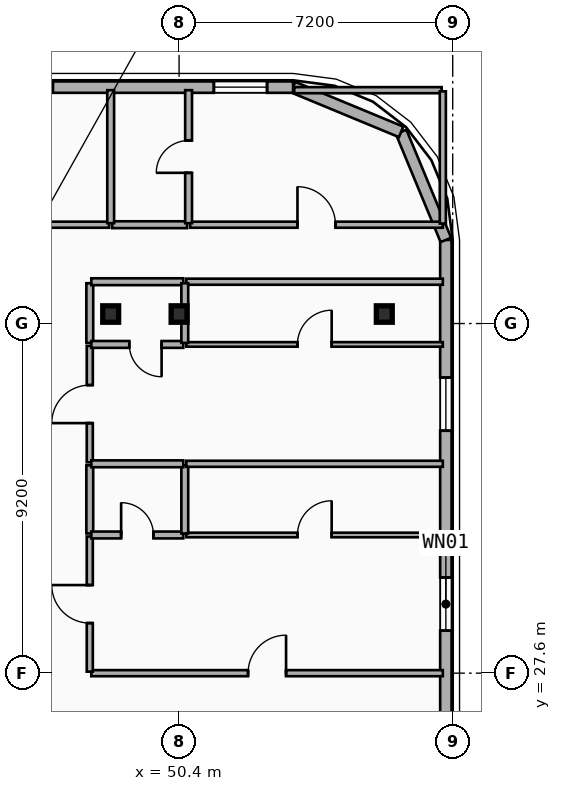
"""IFC4 building model, lengths in metres.
Left out: names, types, materials, properties, quantities, classifications, styles, units other than length and angle.
Written with IfcOpenShell. Run it as: python <this file> out.ifc"""

import sys

from ifc_helpers import new_model, si_unit, direction, frame, frame_2d, origin, origin_2d, place, context, subcontext, project, spatial, rectangle, i_section, extrude, element, fill, save


model = new_model("IFC4")
c1 = context("Model", 3, precision=1e-05, world=origin(), true_north=direction((0.0, 1.0)))
c2 = subcontext(c1, "Body", "Model", "MODEL_VIEW")
j1 = project(units=[si_unit("LENGTHUNIT", "METRE"), si_unit("PLANEANGLEUNIT", "RADIAN")], contexts=[c1])
p1 = place(None, origin())
s1 = spatial("IfcSite", under=j1, at=p1, CompositionType="ELEMENT")
p2 = place(p1, origin())
s2 = spatial("IfcBuilding", under=s1, at=p2, CompositionType="ELEMENT")
p3 = place(p2, frame((0.0, 0.0, 108.3)))
s3 = spatial("IfcBuildingStorey", under=s2, at=p3, CompositionType="ELEMENT", Elevation=108.3)
for number, where, z_axis, x_axis in (
    (1, (48.6, 37.05, 0.0), (0.0, 0.0, 1.0), (1.0, 0.0, 0.0)),
    (2, (50.4, 37.05, 0.0), (0.0, 0.0, 1.0), (1.0, 0.0, 0.0)),
    (3, (55.8, 37.05, 0.0), (0.0, 0.0, 1.0), (1.0, 0.0, 0.0)),
):
    element("IfcColumn", number, at=place(p3, frame(where, z_axis=z_axis, x_axis=x_axis)), inside=s3, PredefinedType="COLUMN", context=c2, shape_type="SweptSolid", body=[
        extrude(i_section(OverallWidth=0.418, OverallDepth=0.432, WebThickness=0.035, FlangeThickness=0.056, FilletRadius=0.015, at=origin_2d()), origin(), (0.0, 0.0, 1.0), 3.5),
    ])
p4 = place(p3, frame((57.42, 39.0, 0.0), z_axis=(0.0, 0.0, 1.0), x_axis=(0.0, -1.0, 0.0)))
e4 = element("IfcWall", 4, at=p4, inside=s3, PredefinedType="SOLIDWALL", context=c2, shape_type="SweptSolid", body=[
    extrude(rectangle(XDim=18.0, YDim=0.3, at=frame_2d((9.0, 0.0))), origin(), (0.0, 0.0, 1.0), 3.24),
])
p5 = place(p4, frame((8.882, 0.0, 0.48)))
e5 = element("IfcOpeningElement", 5, at=p5, cuts=e4, PredefinedType="OPENING", context=c2, shape_type="SweptSolid", body=[
    extrude(rectangle(XDim=1.4, YDim=1.8, at=frame_2d((0.7, 0.9))), frame((0.0, 0.16, 0.0), z_axis=(0.0, -1.0, 0.0), x_axis=(1.0, 0.0, 0.0)), (0.0, 0.0, 1.0), 0.32),
])
p6 = place(p4, frame((3.621, 0.0, 0.48)))
e6 = element("IfcOpeningElement", 6, at=p6, cuts=e4, PredefinedType="OPENING", context=c2, shape_type="SweptSolid", body=[
    extrude(rectangle(XDim=1.4, YDim=1.8, at=frame_2d((0.7, 0.9))), frame((0.0, 0.16, 0.0), z_axis=(0.0, -1.0, 0.0), x_axis=(1.0, 0.0, 0.0)), (0.0, 0.0, 1.0), 0.32),
])
p7 = place(p3, frame((56.243, 41.843, 0.0), z_axis=(0.0, 0.0, 1.0), x_axis=(0.382636798336, -0.92389884758, 0.0)))
e7 = element("IfcWall", 7, at=p7, inside=s3, PredefinedType="SOLIDWALL", context=c2, shape_type="SweptSolid", body=[
    extrude(rectangle(XDim=3.077, YDim=0.3, at=frame_2d((1.538, 0.0))), origin(), (0.0, 0.0, 1.0), 3.24),
])
p8 = place(p3, frame((53.4, 43.02, 0.0), z_axis=(0.0, 0.0, 1.0), x_axis=(0.923882414032, -0.382676475685, 0.0)))
e8 = element("IfcWall", 8, at=p8, inside=s3, PredefinedType="SOLIDWALL", context=c2, shape_type="SweptSolid", body=[
    extrude(rectangle(XDim=3.077, YDim=0.3, at=frame_2d((1.539, 0.0))), origin(), (0.0, 0.0, 1.0), 3.24),
])
p9 = place(p3, frame((4.2, 43.02, 0.0), z_axis=(0.0, 0.0, 1.0), x_axis=(1.0, 0.0, 0.0)))
e9 = element("IfcWall", 9, at=p9, inside=s3, PredefinedType="SOLIDWALL", context=c2, shape_type="SweptSolid", body=[
    extrude(rectangle(XDim=49.2, YDim=0.3, at=frame_2d((24.6, 0.0))), origin(), (0.0, 0.0, 1.0), 3.24),
])
p10 = place(p9, frame((8.09, 0.0, 0.85)))
e10 = element("IfcOpeningElement", 10, at=p10, cuts=e9, PredefinedType="OPENING", context=c2, shape_type="SweptSolid", body=[
    extrude(rectangle(XDim=1.4, YDim=1.8, at=frame_2d((0.7, 0.9))), frame((0.0, 0.16, 0.0), z_axis=(0.0, -1.0, 0.0), x_axis=(1.0, 0.0, 0.0)), (0.0, 0.0, 1.0), 0.32),
])
p11 = place(p9, frame((11.42, 0.0, 0.85)))
e11 = element("IfcOpeningElement", 11, at=p11, cuts=e9, PredefinedType="OPENING", context=c2, shape_type="SweptSolid", body=[
    extrude(rectangle(XDim=1.4, YDim=1.8, at=frame_2d((0.7, 0.9))), frame((0.0, 0.16, 0.0), z_axis=(0.0, -1.0, 0.0), x_axis=(1.0, 0.0, 0.0)), (0.0, 0.0, 1.0), 0.32),
])
p12 = place(p9, frame((19.22, 0.0, 0.85)))
e12 = element("IfcOpeningElement", 12, at=p12, cuts=e9, PredefinedType="OPENING", context=c2, shape_type="SweptSolid", body=[
    extrude(rectangle(XDim=1.4, YDim=1.8, at=frame_2d((0.7, 0.9))), frame((0.0, 0.16, 0.0), z_axis=(0.0, -1.0, 0.0), x_axis=(1.0, 0.0, 0.0)), (0.0, 0.0, 1.0), 0.32),
])
p13 = place(p9, frame((22.441, 0.0, 0.85)))
e13 = element("IfcOpeningElement", 13, at=p13, cuts=e9, PredefinedType="OPENING", context=c2, shape_type="SweptSolid", body=[
    extrude(rectangle(XDim=1.4, YDim=1.8, at=frame_2d((0.7, 0.9))), frame((0.0, 0.16, 0.0), z_axis=(0.0, -1.0, 0.0), x_axis=(1.0, 0.0, 0.0)), (0.0, 0.0, 1.0), 0.32),
])
p14 = place(p9, frame((30.766, 0.0, 0.85)))
e14 = element("IfcOpeningElement", 14, at=p14, cuts=e9, PredefinedType="OPENING", context=c2, shape_type="SweptSolid", body=[
    extrude(rectangle(XDim=1.4, YDim=1.8, at=frame_2d((0.7, 0.9))), frame((0.0, 0.16, 0.0), z_axis=(0.0, -1.0, 0.0), x_axis=(1.0, 0.0, 0.0)), (0.0, 0.0, 1.0), 0.32),
])
p15 = place(p9, frame((32.876, 0.0, 0.85)))
e15 = element("IfcOpeningElement", 15, at=p15, cuts=e9, PredefinedType="OPENING", context=c2, shape_type="SweptSolid", body=[
    extrude(rectangle(XDim=1.4, YDim=1.8, at=frame_2d((0.7, 0.9))), frame((0.0, 0.16, 0.0), z_axis=(0.0, -1.0, 0.0), x_axis=(1.0, 0.0, 0.0)), (0.0, 0.0, 1.0), 0.32),
])
p16 = place(p9, frame((38.857, 0.0, 0.85)))
e16 = element("IfcOpeningElement", 16, at=p16, cuts=e9, PredefinedType="OPENING", context=c2, shape_type="SweptSolid", body=[
    extrude(rectangle(XDim=1.4, YDim=1.8, at=frame_2d((0.7, 0.9))), frame((0.0, 0.16, 0.0), z_axis=(0.0, -1.0, 0.0), x_axis=(1.0, 0.0, 0.0)), (0.0, 0.0, 1.0), 0.32),
])
p17 = place(p9, frame((41.478, 0.0, 0.85)))
e17 = element("IfcOpeningElement", 17, at=p17, cuts=e9, PredefinedType="OPENING", context=c2, shape_type="SweptSolid", body=[
    extrude(rectangle(XDim=1.4, YDim=1.8, at=frame_2d((0.7, 0.9))), frame((0.0, 0.16, 0.0), z_axis=(0.0, -1.0, 0.0), x_axis=(1.0, 0.0, 0.0)), (0.0, 0.0, 1.0), 0.32),
])
p18 = place(p9, frame((47.115, 0.0, 0.85)))
e18 = element("IfcOpeningElement", 18, at=p18, cuts=e9, PredefinedType="OPENING", context=c2, shape_type="SweptSolid", body=[
    extrude(rectangle(XDim=1.4, YDim=1.8, at=frame_2d((0.7, 0.9))), frame((0.0, 0.16, 0.0), z_axis=(0.0, -1.0, 0.0), x_axis=(1.0, 0.0, 0.0)), (0.0, 0.0, 1.0), 0.32),
])
p19 = place(p3, frame((48.09, 27.6, 0.0), z_axis=(0.0, 0.0, 1.0), x_axis=(1.0, 0.0, 0.0)))
e19 = element("IfcWall", 19, at=p19, inside=s3, PredefinedType="PARTITIONING", context=c2, shape_type="SweptSolid", body=[
    extrude(rectangle(XDim=9.25, YDim=0.16, at=frame_2d((4.625, 0.0))), origin(), (0.0, 0.0, 1.0), 2.57),
])
p20 = place(p19, frame((4.125, 0.0, 0.0)))
e20 = element("IfcOpeningElement", 20, at=p20, cuts=e19, PredefinedType="OPENING", context=c2, shape_type="SweptSolid", body=[
    extrude(rectangle(XDim=1.0, YDim=2.15, at=frame_2d((0.5, 1.075))), frame((0.0, 0.09, 0.0), z_axis=(0.0, -1.0, 0.0), x_axis=(1.0, 0.0, 0.0)), (0.0, 0.0, 1.0), 0.18),
])
p21 = place(p3, frame((48.05, 27.64, 0.0), z_axis=(0.0, 0.0, 1.0), x_axis=(0.0, 1.0, 0.0)))
e21 = element("IfcWall", 21, at=p21, inside=s3, PredefinedType="PARTITIONING", context=c2, shape_type="SweptSolid", body=[
    extrude(rectangle(XDim=3.556, YDim=0.16, at=frame_2d((1.778, 0.0))), origin(), (0.0, 0.0, 1.0), 3.24),
])
p22 = place(p21, frame((1.278, 0.0, 0.0)))
e22 = element("IfcOpeningElement", 22, at=p22, cuts=e21, PredefinedType="OPENING", context=c2, shape_type="SweptSolid", body=[
    extrude(rectangle(XDim=1.0, YDim=2.15, at=frame_2d((0.5, 1.075))), frame((0.0, 0.09, 0.0), z_axis=(0.0, -1.0, 0.0), x_axis=(1.0, 0.0, 0.0)), (0.0, 0.0, 1.0), 0.18),
])
p23 = place(p3, frame((48.05, 31.276, 0.0), z_axis=(0.0, 0.0, 1.0), x_axis=(0.0, 1.0, 0.0)))
e23 = element("IfcWall", 23, at=p23, inside=s3, PredefinedType="PLUMBINGWALL", context=c2, shape_type="SweptSolid", body=[
    extrude(rectangle(XDim=1.793, YDim=0.18, at=frame_2d((0.896, 0.0))), origin(), (0.0, 0.0, 1.0), 3.24),
])
p24 = place(p3, frame((48.05, 33.149, 0.0), z_axis=(0.0, 0.0, 1.0), x_axis=(0.0, 1.0, 0.0)))
e24 = element("IfcWall", 24, at=p24, inside=s3, PredefinedType="PARTITIONING", context=c2, shape_type="SweptSolid", body=[
    extrude(rectangle(XDim=3.061, YDim=0.16, at=frame_2d((1.531, 0.0))), origin(), (0.0, 0.0, 1.0), 3.24),
])
p25 = place(p24, frame((1.031, 0.0, 0.0)))
e25 = element("IfcOpeningElement", 25, at=p25, cuts=e24, PredefinedType="OPENING", context=c2, shape_type="SweptSolid", body=[
    extrude(rectangle(XDim=1.0, YDim=2.15, at=frame_2d((0.5, 1.075))), frame((0.0, 0.09, 0.0), z_axis=(0.0, -1.0, 0.0), x_axis=(1.0, 0.0, 0.0)), (0.0, 0.0, 1.0), 0.18),
])
p26 = place(p3, frame((48.05, 36.29, 0.0), z_axis=(0.0, 0.0, 1.0), x_axis=(0.0, 1.0, 0.0)))
e26 = element("IfcWall", 26, at=p26, inside=s3, PredefinedType="PLUMBINGWALL", context=c2, shape_type="SweptSolid", body=[
    extrude(rectangle(XDim=1.57, YDim=0.18, at=frame_2d((0.785, 0.0))), origin(), (0.0, 0.0, 1.0), 2.72),
])
p27 = place(p3, frame((48.09, 37.9, 0.0), z_axis=(0.0, 0.0, 1.0), x_axis=(1.0, 0.0, 0.0)))
e27 = element("IfcWall", 27, at=p27, inside=s3, PredefinedType="PLUMBINGWALL", context=c2, shape_type="SweptSolid", body=[
    extrude(rectangle(XDim=2.42, YDim=0.18, at=frame_2d((1.21, 0.0))), origin(), (0.0, 0.0, 1.0), 3.24),
])
p28 = place(p3, frame((50.59, 37.9, 0.0), z_axis=(0.0, 0.0, 1.0), x_axis=(1.0, 0.0, 0.0)))
e28 = element("IfcWall", 28, at=p28, inside=s3, PredefinedType="PARTITIONING", context=c2, shape_type="SweptSolid", body=[
    extrude(rectangle(XDim=6.75, YDim=0.16, at=frame_2d((3.375, 0.0))), origin(), (0.0, 0.0, 1.0), 3.24),
])
p29 = place(p3, frame((41.575, 39.4, 0.0), z_axis=(0.0, 0.0, 1.0), x_axis=(1.0, 0.0, 0.0)))
e29 = element("IfcWall", 29, at=p29, inside=s3, PredefinedType="PARTITIONING", context=c2, shape_type="SweptSolid", body=[
    extrude(rectangle(XDim=6.985, YDim=0.16, at=frame_2d((3.493, 0.0))), origin(), (0.0, 0.0, 1.0), 3.24),
])
p30 = place(p29, frame((2.992, 0.0, 0.0)))
e30 = element("IfcOpeningElement", 30, at=p30, cuts=e29, PredefinedType="OPENING", context=c2, shape_type="SweptSolid", body=[
    extrude(rectangle(XDim=1.0, YDim=2.15, at=frame_2d((0.5, 1.075))), frame((0.0, 0.09, 0.0), z_axis=(0.0, -1.0, 0.0), x_axis=(1.0, 0.0, 0.0)), (0.0, 0.0, 1.0), 0.18),
])
p31 = place(p3, frame((50.69, 39.4, 0.0), z_axis=(0.0, 0.0, 1.0), x_axis=(1.0, 0.0, 0.0)))
e31 = element("IfcWall", 31, at=p31, inside=s3, PredefinedType="PARTITIONING", context=c2, shape_type="SweptSolid", body=[
    extrude(rectangle(XDim=6.65, YDim=0.16, at=frame_2d((3.325, 0.0))), origin(), (0.0, 0.0, 1.0), 3.24),
])
p32 = place(p31, frame((2.825, 0.0, 0.0)))
e32 = element("IfcOpeningElement", 32, at=p32, cuts=e31, PredefinedType="OPENING", context=c2, shape_type="SweptSolid", body=[
    extrude(rectangle(XDim=1.0, YDim=2.15, at=frame_2d((0.5, 1.075))), frame((0.0, 0.09, 0.0), z_axis=(0.0, -1.0, 0.0), x_axis=(1.0, 0.0, 0.0)), (0.0, 0.0, 1.0), 0.18),
])
p33 = place(p3, frame((48.64, 39.4, 0.0), z_axis=(0.0, 0.0, 1.0), x_axis=(1.0, 0.0, 0.0)))
e33 = element("IfcWall", 33, at=p33, inside=s3, PredefinedType="PLUMBINGWALL", context=c2, shape_type="SweptSolid", body=[
    extrude(rectangle(XDim=1.97, YDim=0.18, at=frame_2d((0.985, 0.0))), origin(), (0.0, 0.0, 1.0), 3.24),
])
p34 = place(p3, frame((48.09, 31.236, 0.0), z_axis=(0.0, 0.0, 1.0), x_axis=(1.0, 0.0, 0.0)))
e34 = element("IfcWall", 34, at=p34, inside=s3, PredefinedType="PLUMBINGWALL", context=c2, shape_type="SweptSolid", body=[
    extrude(rectangle(XDim=2.42, YDim=0.18, at=frame_2d((1.21, 0.0))), origin(), (0.0, 0.0, 1.0), 2.57),
])
p35 = place(p34, frame((0.785, 0.0, 0.0)))
e35 = element("IfcOpeningElement", 35, at=p35, cuts=e34, PredefinedType="OPENING", context=c2, shape_type="SweptSolid", body=[
    extrude(rectangle(XDim=0.85, YDim=2.1, at=frame_2d((0.425, 1.05))), frame((0.0, 0.1, 0.0), z_axis=(0.0, -1.0, 0.0), x_axis=(1.0, 0.0, 0.0)), (0.0, 0.0, 1.0), 0.2),
])
p36 = place(p3, frame((50.59, 31.236, 0.0), z_axis=(0.0, 0.0, 1.0), x_axis=(1.0, 0.0, 0.0)))
e36 = element("IfcWall", 36, at=p36, inside=s3, PredefinedType="PARTITIONING", context=c2, shape_type="SweptSolid", body=[
    extrude(rectangle(XDim=6.75, YDim=0.12, at=frame_2d((3.375, 0.0))), origin(), (0.0, 0.0, 1.0), 2.57),
])
p37 = place(p36, frame((2.925, 0.0, 0.0)))
e37 = element("IfcOpeningElement", 37, at=p37, cuts=e36, PredefinedType="OPENING", context=c2, shape_type="SweptSolid", body=[
    extrude(rectangle(XDim=0.9, YDim=2.1, at=frame_2d((0.45, 1.05))), frame((0.0, 0.07, 0.0), z_axis=(0.0, -1.0, 0.0), x_axis=(1.0, 0.0, 0.0)), (0.0, 0.0, 1.0), 0.14),
])
p38 = place(p3, frame((50.55, 31.276, 0.0), z_axis=(0.0, 0.0, 1.0), x_axis=(0.0, 1.0, 0.0)))
e38 = element("IfcWall", 38, at=p38, inside=s3, PredefinedType="PLUMBINGWALL", context=c2, shape_type="SweptSolid", body=[
    extrude(rectangle(XDim=1.793, YDim=0.18, at=frame_2d((0.896, 0.0))), origin(), (0.0, 0.0, 1.0), 2.57),
])
p39 = place(p3, frame((48.09, 33.109, 0.0), z_axis=(0.0, 0.0, 1.0), x_axis=(1.0, 0.0, 0.0)))
e39 = element("IfcWall", 39, at=p39, inside=s3, PredefinedType="PLUMBINGWALL", context=c2, shape_type="SweptSolid", body=[
    extrude(rectangle(XDim=2.42, YDim=0.18, at=frame_2d((1.21, 0.0))), origin(), (0.0, 0.0, 1.0), 2.57),
])
p40 = place(p3, frame((50.59, 33.109, 0.0), z_axis=(0.0, 0.0, 1.0), x_axis=(1.0, 0.0, 0.0)))
e40 = element("IfcWall", 40, at=p40, inside=s3, PredefinedType="PARTITIONING", context=c2, shape_type="SweptSolid", body=[
    extrude(rectangle(XDim=6.75, YDim=0.16, at=frame_2d((3.375, 0.0))), origin(), (0.0, 0.0, 1.0), 2.57),
])
p41 = place(p3, frame((50.51, 36.25, 0.0), z_axis=(0.0, 0.0, 1.0), x_axis=(-1.0, 0.0, 0.0)))
e41 = element("IfcWall", 41, at=p41, inside=s3, PredefinedType="PLUMBINGWALL", context=c2, shape_type="SweptSolid", body=[
    extrude(rectangle(XDim=2.42, YDim=0.18, at=frame_2d((1.21, 0.0))), origin(), (0.0, 0.0, 1.0), 2.57),
])
p42 = place(p41, frame((0.57, 0.0, 0.0)))
e42 = element("IfcOpeningElement", 42, at=p42, cuts=e41, PredefinedType="OPENING", context=c2, shape_type="SweptSolid", body=[
    extrude(rectangle(XDim=0.85, YDim=2.1, at=frame_2d((0.425, 1.05))), frame((0.0, 0.1, 0.0), z_axis=(0.0, -1.0, 0.0), x_axis=(1.0, 0.0, 0.0)), (0.0, 0.0, 1.0), 0.2),
])
p43 = place(p3, frame((50.59, 36.25, 0.0), z_axis=(0.0, 0.0, 1.0), x_axis=(1.0, 0.0, 0.0)))
e43 = element("IfcWall", 43, at=p43, inside=s3, PredefinedType="PARTITIONING", context=c2, shape_type="SweptSolid", body=[
    extrude(rectangle(XDim=6.75, YDim=0.12, at=frame_2d((3.375, 0.0))), origin(), (0.0, 0.0, 1.0), 2.57),
])
p44 = place(p43, frame((2.925, 0.0, 0.0)))
e44 = element("IfcOpeningElement", 44, at=p44, cuts=e43, PredefinedType="OPENING", context=c2, shape_type="SweptSolid", body=[
    extrude(rectangle(XDim=0.9, YDim=2.1, at=frame_2d((0.45, 1.05))), frame((0.0, 0.07, 0.0), z_axis=(0.0, -1.0, 0.0), x_axis=(1.0, 0.0, 0.0)), (0.0, 0.0, 1.0), 0.14),
])
p45 = place(p3, frame((50.55, 36.29, 0.0), z_axis=(0.0, 0.0, 1.0), x_axis=(0.0, 1.0, 0.0)))
e45 = element("IfcWall", 45, at=p45, inside=s3, PredefinedType="PLUMBINGWALL", context=c2, shape_type="SweptSolid", body=[
    extrude(rectangle(XDim=1.57, YDim=0.18, at=frame_2d((0.785, 0.0))), origin(), (0.0, 0.0, 1.0), 2.57),
])
p46 = place(p3, frame((48.6, 39.44, 0.0), z_axis=(0.0, 0.0, 1.0), x_axis=(0.0, 1.0, 0.0)))
e46 = element("IfcWall", 46, at=p46, inside=s3, PredefinedType="PLUMBINGWALL", context=c2, shape_type="SweptSolid", body=[
    extrude(rectangle(XDim=3.5, YDim=0.18, at=frame_2d((1.75, 0.0))), origin(), (0.0, 0.0, 1.0), 3.24),
])
p47 = place(p3, frame((50.65, 39.44, 0.0), z_axis=(0.0, 0.0, 1.0), x_axis=(0.0, 1.0, 0.0)))
e47 = element("IfcWall", 47, at=p47, inside=s3, PredefinedType="PLUMBINGWALL", context=c2, shape_type="SweptSolid", body=[
    extrude(rectangle(XDim=3.5, YDim=0.18, at=frame_2d((1.75, 0.0))), origin(), (0.0, 0.0, 1.0), 3.24),
])
p48 = place(p47, frame((1.325, 0.0, 0.0)))
e48 = element("IfcOpeningElement", 48, at=p48, cuts=e47, PredefinedType="OPENING", context=c2, shape_type="SweptSolid", body=[
    extrude(rectangle(XDim=0.85, YDim=2.1, at=frame_2d((0.425, 1.05))), frame((0.0, 0.1, 0.0), z_axis=(0.0, -1.0, 0.0), x_axis=(1.0, 0.0, 0.0)), (0.0, 0.0, 1.0), 0.2),
])
p49 = place(p3, frame((53.43, 42.94, 0.0), z_axis=(0.0, 0.0, 1.0), x_axis=(1.0, 0.0, 0.0)))
e49 = element("IfcWall", 49, at=p49, inside=s3, PredefinedType="PARTITIONING", context=c2, shape_type="SweptSolid", body=[
    extrude(rectangle(XDim=3.88, YDim=0.16, at=frame_2d((1.94, 0.0))), origin(), (0.0, 0.0, 1.0), 3.24),
])
p50 = place(p3, frame((57.34, 39.43, 0.0), z_axis=(0.0, 0.0, 1.0), x_axis=(0.0, 1.0, 0.0)))
e50 = element("IfcWall", 50, at=p50, inside=s3, PredefinedType="PARTITIONING", context=c2, shape_type="SweptSolid", body=[
    extrude(rectangle(XDim=3.48, YDim=0.16, at=frame_2d((1.74, 0.0))), origin(), (0.0, 0.0, 1.0), 3.24),
])
p51 = place(p5, origin())
e51 = element("IfcWindow", 51, at=p51, inside=s3, PartitioningType="SINGLE_PANEL", PredefinedType="WINDOW", context=c2, shape_type="SweptSolid", body=[
    extrude(rectangle(XDim=1.4, YDim=1.8, at=frame_2d((0.7, 0.9))), frame((0.0, 0.03, 0.0), z_axis=(0.0, -1.0, 0.0), x_axis=(1.0, 0.0, 0.0)), (0.0, 0.0, 1.0), 0.06),
])
fill(e5, e51)
p52 = place(p6, origin())
e52 = element("IfcWindow", 52, at=p52, inside=s3, PartitioningType="SINGLE_PANEL", PredefinedType="WINDOW", context=c2, shape_type="SweptSolid", body=[
    extrude(rectangle(XDim=1.4, YDim=1.8, at=frame_2d((0.7, 0.9))), frame((0.0, 0.03, 0.0), z_axis=(0.0, -1.0, 0.0), x_axis=(1.0, 0.0, 0.0)), (0.0, 0.0, 1.0), 0.06),
])
fill(e6, e52)
p53 = place(p17, origin())
e53 = element("IfcWindow", 53, at=p53, inside=s3, PartitioningType="SINGLE_PANEL", PredefinedType="WINDOW", context=c2, shape_type="SweptSolid", body=[
    extrude(rectangle(XDim=1.4, YDim=1.8, at=frame_2d((0.7, 0.9))), frame((0.0, 0.03, 0.0), z_axis=(0.0, -1.0, 0.0), x_axis=(1.0, 0.0, 0.0)), (0.0, 0.0, 1.0), 0.06),
])
fill(e17, e53)
p54 = place(p18, origin())
e54 = element("IfcWindow", 54, at=p54, inside=s3, PartitioningType="SINGLE_PANEL", PredefinedType="WINDOW", context=c2, shape_type="SweptSolid", body=[
    extrude(rectangle(XDim=1.4, YDim=1.8, at=frame_2d((0.7, 0.9))), frame((0.0, 0.03, 0.0), z_axis=(0.0, -1.0, 0.0), x_axis=(1.0, 0.0, 0.0)), (0.0, 0.0, 1.0), 0.06),
])
fill(e18, e54)
p55 = place(p20, origin())
e55 = element("IfcDoor", 55, at=p55, inside=s3, OperationType="SINGLE_SWING_RIGHT", PredefinedType="DOOR", context=c2, shape_type="SweptSolid", body=[
    extrude(rectangle(XDim=1.0, YDim=2.15, at=frame_2d((0.5, 1.075))), frame((0.0, 0.025, 0.0), z_axis=(0.0, -1.0, 0.0), x_axis=(1.0, 0.0, 0.0)), (0.0, 0.0, 1.0), 0.05),
])
fill(e20, e55)
p56 = place(p22, origin())
e56 = element("IfcDoor", 56, at=p56, inside=s3, OperationType="SINGLE_SWING_RIGHT", PredefinedType="DOOR", context=c2, shape_type="SweptSolid", body=[
    extrude(rectangle(XDim=1.0, YDim=2.15, at=frame_2d((0.5, 1.075))), frame((0.0, 0.025, 0.0), z_axis=(0.0, -1.0, 0.0), x_axis=(1.0, 0.0, 0.0)), (0.0, 0.0, 1.0), 0.05),
])
fill(e22, e56)
p57 = place(p25, origin())
e57 = element("IfcDoor", 57, at=p57, inside=s3, OperationType="SINGLE_SWING_LEFT", PredefinedType="DOOR", context=c2, shape_type="SweptSolid", body=[
    extrude(rectangle(XDim=1.0, YDim=2.15, at=frame_2d((0.5, 1.075))), frame((0.0, 0.025, 0.0), z_axis=(0.0, -1.0, 0.0), x_axis=(1.0, 0.0, 0.0)), (0.0, 0.0, 1.0), 0.05),
])
fill(e25, e57)
p58 = place(p32, origin())
e58 = element("IfcDoor", 58, at=p58, inside=s3, OperationType="SINGLE_SWING_LEFT", PredefinedType="DOOR", context=c2, shape_type="SweptSolid", body=[
    extrude(rectangle(XDim=1.0, YDim=2.15, at=frame_2d((0.5, 1.075))), frame((0.0, 0.025, 0.0), z_axis=(0.0, -1.0, 0.0), x_axis=(1.0, 0.0, 0.0)), (0.0, 0.0, 1.0), 0.05),
])
fill(e32, e58)
p59 = place(p35, origin())
e59 = element("IfcDoor", 59, at=p59, inside=s3, OperationType="SINGLE_SWING_LEFT", PredefinedType="DOOR", context=c2, shape_type="SweptSolid", body=[
    extrude(rectangle(XDim=0.85, YDim=2.1, at=frame_2d((0.425, 1.05))), frame((0.0, 0.025, 0.0), z_axis=(0.0, -1.0, 0.0), x_axis=(1.0, 0.0, 0.0)), (0.0, 0.0, 1.0), 0.05),
])
fill(e35, e59)
p60 = place(p37, origin())
e60 = element("IfcDoor", 60, at=p60, inside=s3, OperationType="SINGLE_SWING_RIGHT", PredefinedType="DOOR", context=c2, shape_type="SweptSolid", body=[
    extrude(rectangle(XDim=0.9, YDim=2.1, at=frame_2d((0.45, 1.05))), frame((0.0, 0.025, 0.0), z_axis=(0.0, -1.0, 0.0), x_axis=(1.0, 0.0, 0.0)), (0.0, 0.0, 1.0), 0.05),
])
fill(e37, e60)
p61 = place(p42, origin())
e61 = element("IfcDoor", 61, at=p61, inside=s3, OperationType="SINGLE_SWING_LEFT", PredefinedType="DOOR", context=c2, shape_type="SweptSolid", body=[
    extrude(rectangle(XDim=0.85, YDim=2.1, at=frame_2d((0.425, 1.05))), frame((0.0, 0.025, 0.0), z_axis=(0.0, -1.0, 0.0), x_axis=(1.0, 0.0, 0.0)), (0.0, 0.0, 1.0), 0.05),
])
fill(e42, e61)
p62 = place(p44, origin())
e62 = element("IfcDoor", 62, at=p62, inside=s3, OperationType="SINGLE_SWING_RIGHT", PredefinedType="DOOR", context=c2, shape_type="SweptSolid", body=[
    extrude(rectangle(XDim=0.9, YDim=2.1, at=frame_2d((0.45, 1.05))), frame((0.0, 0.025, 0.0), z_axis=(0.0, -1.0, 0.0), x_axis=(1.0, 0.0, 0.0)), (0.0, 0.0, 1.0), 0.05),
])
fill(e44, e62)
p63 = place(p48, origin())
e63 = element("IfcDoor", 63, at=p63, inside=s3, OperationType="SINGLE_SWING_LEFT", PredefinedType="DOOR", context=c2, shape_type="SweptSolid", body=[
    extrude(rectangle(XDim=0.85, YDim=2.1, at=frame_2d((0.425, 1.05))), frame((0.0, 0.025, 0.0), z_axis=(0.0, -1.0, 0.0), x_axis=(1.0, 0.0, 0.0)), (0.0, 0.0, 1.0), 0.05),
])
fill(e48, e63)
save(model, sys.argv[1])
